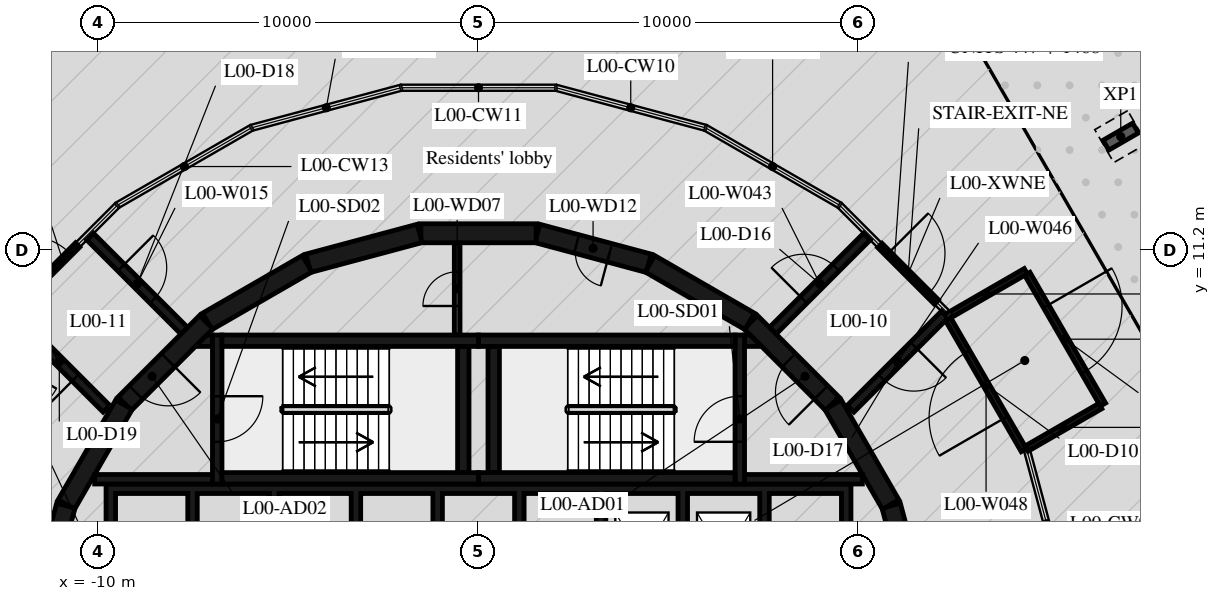
"""IFC4 building model, lengths in metres.
Left out: names, types, materials, properties, quantities, classifications, styles, units other than length and angle.
Written with IfcOpenShell. Run it as: python <this file> out.ifc"""

import sys

from ifc_helpers import new_model, si_unit, direction, frame, frame_2d, origin, origin_2d, place, context, subcontext, project, spatial, polyline, rectangle, i_section, outline, extrude, element, fill, save


model = new_model("IFC4")
c1 = context("Model", 3, precision=1e-05, world=origin(), true_north=direction((0.0, 1.0)))
c2 = subcontext(c1, "Body", "Model", "MODEL_VIEW")
j1 = project(units=[si_unit("LENGTHUNIT", "METRE"), si_unit("PLANEANGLEUNIT", "RADIAN")], contexts=[c1])
p1 = place(None, origin())
s1 = spatial("IfcSite", under=j1, at=p1, CompositionType="ELEMENT")
p2 = place(p1, origin())
s2 = spatial("IfcBuilding", under=s1, at=p2, CompositionType="ELEMENT")
p3 = place(p2, origin())
s3 = spatial("IfcBuildingStorey", under=s2, at=p3, CompositionType="ELEMENT", Elevation=0.0)
p4 = place(p3, frame((16.899, 14.19, -0.42), z_axis=(0.0, 0.0, 1.0), x_axis=(0.50000017485, -0.866025302835, 0.0)))
e1 = element("IfcColumn", 1, at=p4, inside=s3, PredefinedType="COLUMN", context=c2, shape_type="SweptSolid", body=[
    extrude(i_section(OverallWidth=0.3, OverallDepth=0.9, WebThickness=0.019, FlangeThickness=0.035, FilletRadius=0.03, at=origin_2d()), origin(), (0.0, 0.0, 1.0), 9.04),
])
p5 = place(p3, frame((10.562, 11.325, 0.0), z_axis=(0.0, 0.0, 1.0), x_axis=(0.707106781187, -0.707106781187, 0.0)))
e2 = element("IfcWall", 2, at=p5, inside=s3, PredefinedType="STANDARD", context=c2, shape_type="SweptSolid", body=[
    extrude(rectangle(XDim=2.1, YDim=0.16, at=frame_2d((1.05, 0.0))), origin(), (0.0, 0.0, 1.0), 8.5),
])
p6 = place(p5, frame((0.3, 0.0, 0.0)))
e3 = element("IfcOpeningElement", 3, at=p6, cuts=e2, PredefinedType="OPENING", context=c2, shape_type="SweptSolid", body=[
    extrude(rectangle(XDim=1.5, YDim=2.1, at=frame_2d((0.75, 1.05))), frame((0.0, 0.09, 0.0), z_axis=(0.0, -1.0, 0.0), x_axis=(1.0, 0.0, 0.0)), (0.0, 0.0, 1.0), 0.18),
])
p7 = place(p3, frame((-12.032, 9.855, 0.0), z_axis=(0.0, 0.0, 1.0), x_axis=(0.70704865247, 0.707164905125, 0.0)))
e4 = element("IfcWall", 4, at=p7, inside=s3, PredefinedType="STANDARD", context=c2, shape_type="SweptSolid", body=[
    extrude(rectangle(XDim=2.1, YDim=0.16, at=frame_2d((1.05, 0.0))), origin(), (0.0, 0.0, 1.0), 8.5),
])
p8 = place(p7, frame((0.3, 0.0, 0.0)))
e5 = element("IfcOpeningElement", 5, at=p8, cuts=e4, PredefinedType="OPENING", context=c2, shape_type="SweptSolid", body=[
    extrude(rectangle(XDim=1.5, YDim=2.1, at=frame_2d((0.75, 1.05))), frame((0.0, 0.09, 0.0), z_axis=(0.0, -1.0, 0.0), x_axis=(1.0, 0.0, 0.0)), (0.0, 0.0, 1.0), 0.18),
])
for number, where, z_axis, x_axis in (
    (6, (11.643, 1.55, 0.0), (0.0, 0.0, 1.0), (-0.259, 0.966, 0.0)),
    (7, (10.845, 4.51, 0.0), (0.0, 0.0, 1.0), (-0.5, 0.866, 0.0)),
):
    element("IfcWall", number, at=place(p3, frame(where, z_axis=z_axis, x_axis=x_axis)), inside=s3, PredefinedType="SHEAR", context=c2, shape_type="SweptSolid", body=[
        extrude(rectangle(XDim=3.033, YDim=0.5, at=frame_2d((1.516, 0.0))), origin(), (0.0, 0.0, 1.0), 8.62),
    ])
p9 = place(p3, frame((9.308, 7.164, 0.0), z_axis=(0.0, 0.0, 1.0), x_axis=(-0.707106781187, 0.707106781187, 0.0)))
e8 = element("IfcWall", 8, at=p9, inside=s3, PredefinedType="SHEAR", context=c2, shape_type="SweptSolid", body=[
    extrude(rectangle(XDim=3.032, YDim=0.5, at=frame_2d((1.516, 0.0))), origin(), (0.0, 0.0, 1.0), 8.62),
])
p10 = place(p9, frame((0.416, 0.0, 0.0)))
e9 = element("IfcOpeningElement", 9, at=p10, cuts=e8, PredefinedType="OPENING", context=c2, shape_type="SweptSolid", body=[
    extrude(rectangle(XDim=1.2, YDim=2.1, at=frame_2d((0.6, 1.05))), frame((0.0, 0.26, 0.0), z_axis=(0.0, -1.0, 0.0), x_axis=(1.0, 0.0, 0.0)), (0.0, 0.0, 1.0), 0.52),
])
p11 = place(p3, frame((7.137, 9.329, 0.0), z_axis=(0.0, 0.0, 1.0), x_axis=(-0.865975092491, 0.500087131594, 0.0)))
e10 = element("IfcWall", 10, at=p11, inside=s3, PredefinedType="SHEAR", context=c2, shape_type="SweptSolid", body=[
    extrude(rectangle(XDim=3.033, YDim=0.5, at=frame_2d((1.516, 0.0))), origin(), (0.0, 0.0, 1.0), 8.62),
])
p12 = place(p3, frame((4.479, 10.858, 0.0), z_axis=(0.0, 0.0, 1.0), x_axis=(-0.965948410781, 0.258734743916, 0.0)))
e11 = element("IfcWall", 11, at=p12, inside=s3, PredefinedType="SHEAR", context=c2, shape_type="SweptSolid", body=[
    extrude(rectangle(XDim=3.033, YDim=0.5, at=frame_2d((1.516, 0.0))), origin(), (0.0, 0.0, 1.0), 8.62),
])
p13 = place(p12, frame((1.066, 0.0, 0.0)))
e12 = element("IfcOpeningElement", 12, at=p13, cuts=e11, PredefinedType="OPENING", context=c2, shape_type="SweptSolid", body=[
    extrude(rectangle(XDim=0.9, YDim=2.1, at=frame_2d((0.45, 1.05))), frame((0.0, 0.26, 0.0), z_axis=(0.0, -1.0, 0.0), x_axis=(1.0, 0.0, 0.0)), (0.0, 0.0, 1.0), 0.52),
])
for number, where, z_axis, x_axis in (
    (13, (1.516, 11.647, 0.0), (0.0, 0.0, 1.0), (-1.0, 0.0, 0.0)),
    (14, (-1.55, 11.643, 0.0), (0.0, 0.0, 1.0), (-0.966, -0.259, 0.0)),
    (15, (-4.51, 10.845, 0.0), (0.0, 0.0, 1.0), (-0.866, -0.5, 0.0)),
):
    element("IfcWall", number, at=place(p3, frame(where, z_axis=z_axis, x_axis=x_axis)), inside=s3, PredefinedType="SHEAR", context=c2, shape_type="SweptSolid", body=[
        extrude(rectangle(XDim=3.033, YDim=0.5, at=frame_2d((1.516, 0.0))), origin(), (0.0, 0.0, 1.0), 8.62),
    ])
p14 = place(p3, frame((-7.164, 9.308, 0.0), z_axis=(0.0, 0.0, 1.0), x_axis=(-0.707106781187, -0.707106781187, 0.0)))
e16 = element("IfcWall", 16, at=p14, inside=s3, PredefinedType="SHEAR", context=c2, shape_type="SweptSolid", body=[
    extrude(rectangle(XDim=3.032, YDim=0.5, at=frame_2d((1.516, 0.0))), origin(), (0.0, 0.0, 1.0), 8.62),
])
p15 = place(p14, frame((1.416, 0.0, 0.0)))
e17 = element("IfcOpeningElement", 17, at=p15, cuts=e16, PredefinedType="OPENING", context=c2, shape_type="SweptSolid", body=[
    extrude(rectangle(XDim=1.2, YDim=2.1, at=frame_2d((0.6, 1.05))), frame((0.0, 0.26, 0.0), z_axis=(0.0, -1.0, 0.0), x_axis=(1.0, 0.0, 0.0)), (0.0, 0.0, 1.0), 0.52),
])
for number, where, z_axis, x_axis in (
    (18, (-9.329, 7.137, 0.0), (0.0, 0.0, 1.0), (-0.5, -0.866, 0.0)),
    (19, (-10.858, 4.479, 0.0), (0.0, 0.0, 1.0), (-0.259, -0.966, 0.0)),
):
    element("IfcWall", number, at=place(p3, frame(where, z_axis=z_axis, x_axis=x_axis)), inside=s3, PredefinedType="SHEAR", context=c2, shape_type="SweptSolid", body=[
        extrude(rectangle(XDim=3.033, YDim=0.5, at=frame_2d((1.516, 0.0))), origin(), (0.0, 0.0, 1.0), 8.62),
    ])
for number, where, z_axis, x_axis in (
    (20, (0.0, 5.2, 0.0), (0.0, 0.0, 1.0), (1.0, 0.0, 0.0)),
    (21, (0.0, 8.82, 0.0), (0.0, 0.0, 1.0), (1.0, 0.0, 0.0)),
):
    element("IfcWall", number, at=place(p3, frame(where, z_axis=z_axis, x_axis=x_axis)), inside=s3, PredefinedType="SHEAR", context=c2, shape_type="SweptSolid", body=[
        extrude(rectangle(XDim=6.75, YDim=0.3, at=frame_2d((3.375, 0.0))), origin(), (0.0, 0.0, 1.0), 8.62),
    ])
p16 = place(p3, frame((0.4, 5.35, 0.0), z_axis=(0.0, 0.0, 1.0), x_axis=(0.0, 1.0, 0.0)))
e22 = element("IfcWall", 22, at=p16, inside=s3, PredefinedType="SHEAR", context=c2, shape_type="SweptSolid", body=[
    extrude(rectangle(XDim=3.32, YDim=0.3, at=frame_2d((1.66, 0.0))), origin(), (0.0, 0.0, 1.0), 8.62),
])
p17 = place(p3, frame((6.875, 5.05, 0.0), z_axis=(0.0, 0.0, 1.0), x_axis=(0.0, 1.0, 0.0)))
e23 = element("IfcWall", 23, at=p17, inside=s3, PredefinedType="SHEAR", context=c2, shape_type="SweptSolid", body=[
    extrude(rectangle(XDim=3.92, YDim=0.25, at=frame_2d((1.96, 0.0))), origin(), (0.0, 0.0, 1.0), 8.62),
])
p18 = place(p17, frame((1.11, 0.0, 0.0)))
e24 = element("IfcOpeningElement", 24, at=p18, cuts=e23, PredefinedType="OPENING", context=c2, shape_type="SweptSolid", body=[
    extrude(rectangle(XDim=1.2, YDim=2.1, at=frame_2d((0.6, 1.05))), frame((0.0, 0.135, 0.0), z_axis=(0.0, -1.0, 0.0), x_axis=(1.0, 0.0, 0.0)), (0.0, 0.0, 1.0), 0.27),
])
p19 = place(p3, frame((7.0, 5.175, 0.0), z_axis=(0.0, 0.0, 1.0), x_axis=(1.0, 0.0, 0.0)))
e25 = element("IfcWall", 25, at=p19, inside=s3, PredefinedType="SHEAR", context=c2, shape_type="SweptSolid", body=[
    extrude(rectangle(XDim=3.1, YDim=0.25, at=frame_2d((1.55, 0.0))), origin(), (0.0, 0.0, 1.0), 8.62),
])
p20 = place(p3, origin())
e26 = element("IfcWall", 26, at=p20, inside=s3, PredefinedType="SHEAR", context=c2, shape_type="SweptSolid", body=[
    extrude(outline(polyline([(7.448, 8.67), (7.0, 8.67), (7.0, 8.97), (7.148, 8.97), (7.448, 8.67)])), origin(), (0.0, 0.0, 1.0), 8.62),
])
for number, where, z_axis, x_axis in (
    (27, (-6.75, 5.2, 0.0), (0.0, 0.0, 1.0), (1.0, 0.0, 0.0)),
    (28, (-6.75, 8.82, 0.0), (0.0, 0.0, 1.0), (1.0, 0.0, 0.0)),
):
    element("IfcWall", number, at=place(p3, frame(where, z_axis=z_axis, x_axis=x_axis)), inside=s3, PredefinedType="SHEAR", context=c2, shape_type="SweptSolid", body=[
        extrude(rectangle(XDim=6.75, YDim=0.3, at=frame_2d((3.375, 0.0))), origin(), (0.0, 0.0, 1.0), 8.62),
    ])
p21 = place(p3, frame((-0.4, 5.35, 0.0), z_axis=(0.0, 0.0, 1.0), x_axis=(0.0, 1.0, 0.0)))
e29 = element("IfcWall", 29, at=p21, inside=s3, PredefinedType="SHEAR", context=c2, shape_type="SweptSolid", body=[
    extrude(rectangle(XDim=3.32, YDim=0.3, at=frame_2d((1.66, 0.0))), origin(), (0.0, 0.0, 1.0), 8.62),
])
p22 = place(p3, frame((-6.875, 8.97, 0.0), z_axis=(0.0, 0.0, 1.0), x_axis=(0.0, -1.0, 0.0)))
e30 = element("IfcWall", 30, at=p22, inside=s3, PredefinedType="SHEAR", context=c2, shape_type="SweptSolid", body=[
    extrude(rectangle(XDim=3.92, YDim=0.25, at=frame_2d((1.96, 0.0))), origin(), (0.0, 0.0, 1.0), 8.62),
])
p23 = place(p22, frame((1.61, 0.0, 0.0)))
e31 = element("IfcOpeningElement", 31, at=p23, cuts=e30, PredefinedType="OPENING", context=c2, shape_type="SweptSolid", body=[
    extrude(rectangle(XDim=1.2, YDim=2.1, at=frame_2d((0.6, 1.05))), frame((0.0, 0.135, 0.0), z_axis=(0.0, -1.0, 0.0), x_axis=(1.0, 0.0, 0.0)), (0.0, 0.0, 1.0), 0.27),
])
p24 = place(p3, frame((-7.0, 5.175, 0.0), z_axis=(0.0, 0.0, 1.0), x_axis=(-1.0, 0.0, 0.0)))
e32 = element("IfcWall", 32, at=p24, inside=s3, PredefinedType="SHEAR", context=c2, shape_type="SweptSolid", body=[
    extrude(rectangle(XDim=3.1, YDim=0.25, at=frame_2d((1.55, 0.0))), origin(), (0.0, 0.0, 1.0), 8.62),
])
p25 = place(p3, origin())
e33 = element("IfcWall", 33, at=p25, inside=s3, PredefinedType="SHEAR", context=c2, shape_type="SweptSolid", body=[
    extrude(outline(polyline([(-7.148, 8.97), (-7.0, 8.97), (-7.0, 8.67), (-7.448, 8.67), (-7.148, 8.97)])), origin(), (0.0, 0.0, 1.0), 8.62),
])
p26 = place(p3, origin())
e34 = element("IfcWall", 34, at=p26, inside=s3, PredefinedType="SHEAR", context=c2, shape_type="SweptSolid", body=[
    extrude(outline(polyline([(-9.55, 4.8), (-7.65, 4.8), (-7.65, 1.9), (-7.4, 1.9), (-7.4, 4.8), (-5.5, 4.8), (-5.5, 1.9), (-5.25, 1.9), (-5.25, 4.8), (-3.35, 4.8), (-3.35, 1.9), (-3.1, 1.9), (-3.1, 4.8), (-1.2, 4.8), (-1.2, 1.9), (-0.95, 1.9), (-0.95, 4.8), (0.95, 4.8), (0.95, 1.9), (1.2, 1.9), (1.2, 4.8), (3.1, 4.8), (3.1, 1.9), (3.35, 1.9), (3.35, 4.8), (5.25, 4.8), (5.25, 1.9), (5.5, 1.9), (5.5, 4.8), (7.4, 4.8), (7.4, 1.9), (7.65, 1.9), (7.65, 4.8), (9.55, 4.8), (9.55, 1.9), (9.8, 1.9), (9.8, 4.8), (9.8, 5.05), (-9.8, 5.05), (-9.8, 4.8), (-9.8, 1.9), (-9.55, 1.9), (-9.55, 4.8)])), origin(), (0.0, 0.0, 1.0), 8.62),
])
p27 = place(p3, frame((-0.562, 8.97, 0.0), z_axis=(0.0, 0.0, 1.0), x_axis=(0.0, 1.0, 0.0)))
e35 = element("IfcWall", 35, at=p27, inside=s3, PredefinedType="PARTITIONING", context=c2, shape_type="SweptSolid", body=[
    extrude(rectangle(XDim=2.427, YDim=0.15, at=frame_2d((1.214, 0.0))), origin(), (0.0, 0.0, 1.0), 8.62),
])
p28 = place(p27, frame((0.764, 0.0, 0.0)))
e36 = element("IfcOpeningElement", 36, at=p28, cuts=e35, PredefinedType="OPENING", context=c2, shape_type="SweptSolid", body=[
    extrude(rectangle(XDim=0.9, YDim=2.1, at=frame_2d((0.45, 1.05))), frame((0.0, 0.085, 0.0), z_axis=(0.0, -1.0, 0.0), x_axis=(1.0, 0.0, 0.0)), (0.0, 0.0, 1.0), 0.17),
])
p29 = place(p3, frame((-10.22, 11.56, 0.0), z_axis=(0.0, 0.0, 1.0), x_axis=(0.707106781187, -0.707106781187, 0.0)))
e37 = element("IfcWall", 37, at=p29, inside=s3, PredefinedType="PARTITIONING", context=c2, shape_type="SweptSolid", body=[
    extrude(rectangle(XDim=3.507, YDim=0.25, at=frame_2d((1.754, 0.0))), origin(), (0.0, 0.0, 1.0), 8.62),
])
p30 = place(p29, frame((1.154, 0.0, 0.0)))
e38 = element("IfcOpeningElement", 38, at=p30, cuts=e37, PredefinedType="OPENING", context=c2, shape_type="SweptSolid", body=[
    extrude(rectangle(XDim=1.2, YDim=2.1, at=frame_2d((0.6, 1.05))), frame((0.0, 0.135, 0.0), z_axis=(0.0, -1.0, 0.0), x_axis=(1.0, 0.0, 0.0)), (0.0, 0.0, 1.0), 0.27),
])
p31 = place(p3, frame((-9.79, 7.03, 0.0), z_axis=(0.0, 0.0, 1.0), x_axis=(-0.707106781187, 0.707106781187, 0.0)))
e39 = element("IfcWall", 39, at=p31, inside=s3, PredefinedType="PARTITIONING", context=c2, shape_type="SweptSolid", body=[
    extrude(rectangle(XDim=3.507, YDim=0.25, at=frame_2d((1.754, 0.0))), origin(), (0.0, 0.0, 1.0), 8.62),
])
p32 = place(p31, frame((1.154, 0.0, 0.0)))
e40 = element("IfcOpeningElement", 40, at=p32, cuts=e39, PredefinedType="OPENING", context=c2, shape_type="SweptSolid", body=[
    extrude(rectangle(XDim=1.2, YDim=2.1, at=frame_2d((0.6, 1.05))), frame((0.0, 0.135, 0.0), z_axis=(0.0, -1.0, 0.0), x_axis=(1.0, 0.0, 0.0)), (0.0, 0.0, 1.0), 0.27),
])
p33 = place(p3, frame((7.74, 9.08, 0.0), z_axis=(0.0, 0.0, 1.0), x_axis=(0.707106781187, 0.707106781187, 0.0)))
e41 = element("IfcWall", 41, at=p33, inside=s3, PredefinedType="PARTITIONING", context=c2, shape_type="SweptSolid", body=[
    extrude(rectangle(XDim=3.507, YDim=0.25, at=frame_2d((1.754, 0.0))), origin(), (0.0, 0.0, 1.0), 8.62),
])
p34 = place(p33, frame((1.154, 0.0, 0.0)))
e42 = element("IfcOpeningElement", 42, at=p34, cuts=e41, PredefinedType="OPENING", context=c2, shape_type="SweptSolid", body=[
    extrude(rectangle(XDim=1.2, YDim=2.1, at=frame_2d((0.6, 1.05))), frame((0.0, 0.135, 0.0), z_axis=(0.0, -1.0, 0.0), x_axis=(1.0, 0.0, 0.0)), (0.0, 0.0, 1.0), 0.27),
])
p35 = place(p3, frame((12.27, 9.51, 0.0), z_axis=(0.0, 0.0, 1.0), x_axis=(-0.707106781187, -0.707106781187, 0.0)))
e43 = element("IfcWall", 43, at=p35, inside=s3, PredefinedType="PARTITIONING", context=c2, shape_type="SweptSolid", body=[
    extrude(rectangle(XDim=3.507, YDim=0.25, at=frame_2d((1.754, 0.0))), origin(), (0.0, 0.0, 1.0), 8.62),
])
p36 = place(p35, frame((1.154, 0.0, 0.0)))
e44 = element("IfcOpeningElement", 44, at=p36, cuts=e43, PredefinedType="OPENING", context=c2, shape_type="SweptSolid", body=[
    extrude(rectangle(XDim=1.2, YDim=2.1, at=frame_2d((0.6, 1.05))), frame((0.0, 0.135, 0.0), z_axis=(0.0, -1.0, 0.0), x_axis=(1.0, 0.0, 0.0)), (0.0, 0.0, 1.0), 0.27),
])
p37 = place(p3, frame((12.32, 9.45, 0.0), z_axis=(0.0, 0.0, 1.0), x_axis=(0.866177122335, 0.499737123639, 0.0)))
e45 = element("IfcWall", 45, at=p37, inside=s3, PredefinedType="PARTITIONING", context=c2, shape_type="SweptSolid", body=[
    extrude(rectangle(XDim=2.401, YDim=0.16, at=frame_2d((1.201, 0.0))), origin(), (0.0, 0.0, 1.0), 3.0),
])
p38 = place(p3, frame((14.35, 5.94, 0.0), z_axis=(0.0, 0.0, 1.0), x_axis=(-0.500636730463, 0.865657475051, 0.0)))
e46 = element("IfcWall", 46, at=p38, inside=s3, PredefinedType="PARTITIONING", context=c2, shape_type="SweptSolid", body=[
    extrude(rectangle(XDim=3.975, YDim=0.16, at=frame_2d((1.987, 0.0))), origin(), (0.0, 0.0, 1.0), 3.0),
])
p39 = place(p38, frame((0.987, 0.0, 0.0)))
e47 = element("IfcOpeningElement", 47, at=p39, cuts=e46, PredefinedType="OPENING", context=c2, shape_type="SweptSolid", body=[
    extrude(rectangle(XDim=2.0, YDim=2.4, at=frame_2d((1.0, 1.2))), frame((0.0, 0.09, 0.0), z_axis=(0.0, -1.0, 0.0), x_axis=(1.0, 0.0, 0.0)), (0.0, 0.0, 1.0), 0.18),
])
p40 = place(p3, frame((14.44, 10.581, 0.0), z_axis=(0.0, 0.0, 1.0), x_axis=(0.500636730463, -0.865657475051, 0.0)))
e48 = element("IfcWall", 48, at=p40, inside=s3, PredefinedType="PARTITIONING", context=c2, shape_type="SweptSolid", body=[
    extrude(rectangle(XDim=3.975, YDim=0.16, at=frame_2d((1.987, 0.0))), origin(), (0.0, 0.0, 1.0), 3.0),
])
p41 = place(p40, frame((0.987, 0.0, 0.0)))
e49 = element("IfcOpeningElement", 49, at=p41, cuts=e48, PredefinedType="OPENING", context=c2, shape_type="SweptSolid", body=[
    extrude(rectangle(XDim=2.0, YDim=2.4, at=frame_2d((1.0, 1.2))), frame((0.0, 0.09, 0.0), z_axis=(0.0, -1.0, 0.0), x_axis=(1.0, 0.0, 0.0)), (0.0, 0.0, 1.0), 0.18),
])
p42 = place(p3, frame((16.361, 7.1, 0.0), z_axis=(0.0, 0.0, 1.0), x_axis=(-0.866171078478, -0.499747599102, 0.0)))
e50 = element("IfcWall", 50, at=p42, inside=s3, PredefinedType="PARTITIONING", context=c2, shape_type="SweptSolid", body=[
    extrude(rectangle(XDim=2.241, YDim=0.16, at=frame_2d((1.121, 0.0))), origin(), (0.0, 0.0, 1.0), 3.0),
])
p43 = place(p6, origin())
e51 = element("IfcDoor", 51, at=p43, inside=s3, OperationType="DOUBLE_DOOR_SINGLE_SWING", PredefinedType="DOOR", context=c2, shape_type="SweptSolid", body=[
    extrude(rectangle(XDim=1.5, YDim=2.1, at=frame_2d((0.75, 1.05))), frame((0.0, 0.025, 0.0), z_axis=(0.0, -1.0, 0.0), x_axis=(1.0, 0.0, 0.0)), (0.0, 0.0, 1.0), 0.05),
])
fill(e3, e51)
p44 = place(p8, origin())
e52 = element("IfcDoor", 52, at=p44, inside=s3, OperationType="DOUBLE_DOOR_SINGLE_SWING", PredefinedType="DOOR", context=c2, shape_type="SweptSolid", body=[
    extrude(rectangle(XDim=1.5, YDim=2.1, at=frame_2d((0.75, 1.05))), frame((0.0, 0.025, 0.0), z_axis=(0.0, -1.0, 0.0), x_axis=(1.0, 0.0, 0.0)), (0.0, 0.0, 1.0), 0.05),
])
fill(e5, e52)
p45 = place(p18, origin())
e53 = element("IfcDoor", 53, at=p45, inside=s3, OperationType="SINGLE_SWING_LEFT", PredefinedType="DOOR", context=c2, shape_type="SweptSolid", body=[
    extrude(rectangle(XDim=1.2, YDim=2.1, at=frame_2d((0.6, 1.05))), frame((0.0, 0.025, 0.0), z_axis=(0.0, -1.0, 0.0), x_axis=(1.0, 0.0, 0.0)), (0.0, 0.0, 1.0), 0.05),
])
fill(e24, e53)
p46 = place(p10, origin())
e54 = element("IfcDoor", 54, at=p46, inside=s3, OperationType="SINGLE_SWING_RIGHT", PredefinedType="DOOR", context=c2, shape_type="SweptSolid", body=[
    extrude(rectangle(XDim=1.2, YDim=2.1, at=frame_2d((0.6, 1.05))), frame((0.0, 0.025, 0.0), z_axis=(0.0, -1.0, 0.0), x_axis=(1.0, 0.0, 0.0)), (0.0, 0.0, 1.0), 0.05),
])
fill(e9, e54)
p47 = place(p23, origin())
e55 = element("IfcDoor", 55, at=p47, inside=s3, OperationType="SINGLE_SWING_LEFT", PredefinedType="DOOR", context=c2, shape_type="SweptSolid", body=[
    extrude(rectangle(XDim=1.2, YDim=2.1, at=frame_2d((0.6, 1.05))), frame((0.0, 0.025, 0.0), z_axis=(0.0, -1.0, 0.0), x_axis=(1.0, 0.0, 0.0)), (0.0, 0.0, 1.0), 0.05),
])
fill(e31, e55)
p48 = place(p15, origin())
e56 = element("IfcDoor", 56, at=p48, inside=s3, OperationType="SINGLE_SWING_RIGHT", PredefinedType="DOOR", context=c2, shape_type="SweptSolid", body=[
    extrude(rectangle(XDim=1.2, YDim=2.1, at=frame_2d((0.6, 1.05))), frame((0.0, 0.025, 0.0), z_axis=(0.0, -1.0, 0.0), x_axis=(1.0, 0.0, 0.0)), (0.0, 0.0, 1.0), 0.05),
])
fill(e17, e56)
p49 = place(p28, origin())
e57 = element("IfcDoor", 57, at=p49, inside=s3, OperationType="SINGLE_SWING_RIGHT", PredefinedType="DOOR", context=c2, shape_type="SweptSolid", body=[
    extrude(rectangle(XDim=0.9, YDim=2.1, at=frame_2d((0.45, 1.05))), frame((0.0, 0.025, 0.0), z_axis=(0.0, -1.0, 0.0), x_axis=(1.0, 0.0, 0.0)), (0.0, 0.0, 1.0), 0.05),
])
fill(e36, e57)
p50 = place(p13, origin())
e58 = element("IfcDoor", 58, at=p50, inside=s3, OperationType="SINGLE_SWING_LEFT", PredefinedType="DOOR", context=c2, shape_type="SweptSolid", body=[
    extrude(rectangle(XDim=0.9, YDim=2.1, at=frame_2d((0.45, 1.05))), frame((0.0, 0.025, 0.0), z_axis=(0.0, -1.0, 0.0), x_axis=(1.0, 0.0, 0.0)), (0.0, 0.0, 1.0), 0.05),
])
fill(e12, e58)
p51 = place(p39, origin())
e59 = element("IfcDoor", 59, at=p51, inside=s3, OperationType="DOUBLE_DOOR_SINGLE_SWING", PredefinedType="DOOR", context=c2, shape_type="SweptSolid", body=[
    extrude(rectangle(XDim=2.0, YDim=2.4, at=frame_2d((1.0, 1.2))), frame((0.0, 0.025, 0.0), z_axis=(0.0, -1.0, 0.0), x_axis=(1.0, 0.0, 0.0)), (0.0, 0.0, 1.0), 0.05),
])
fill(e47, e59)
p52 = place(p41, origin())
e60 = element("IfcDoor", 60, at=p52, inside=s3, OperationType="DOUBLE_DOOR_SINGLE_SWING", PredefinedType="DOOR", context=c2, shape_type="SweptSolid", body=[
    extrude(rectangle(XDim=2.0, YDim=2.4, at=frame_2d((1.0, 1.2))), frame((0.0, 0.025, 0.0), z_axis=(0.0, -1.0, 0.0), x_axis=(1.0, 0.0, 0.0)), (0.0, 0.0, 1.0), 0.05),
])
fill(e49, e60)
p53 = place(p34, origin())
e61 = element("IfcDoor", 61, at=p53, inside=s3, OperationType="SINGLE_SWING_LEFT", PredefinedType="DOOR", context=c2, shape_type="SweptSolid", body=[
    extrude(rectangle(XDim=1.2, YDim=2.1, at=frame_2d((0.6, 1.05))), frame((0.0, 0.025, 0.0), z_axis=(0.0, -1.0, 0.0), x_axis=(1.0, 0.0, 0.0)), (0.0, 0.0, 1.0), 0.05),
])
fill(e42, e61)
p54 = place(p36, origin())
e62 = element("IfcDoor", 62, at=p54, inside=s3, OperationType="SINGLE_SWING_LEFT", PredefinedType="DOOR", context=c2, shape_type="SweptSolid", body=[
    extrude(rectangle(XDim=1.2, YDim=2.1, at=frame_2d((0.6, 1.05))), frame((0.0, 0.025, 0.0), z_axis=(0.0, -1.0, 0.0), x_axis=(1.0, 0.0, 0.0)), (0.0, 0.0, 1.0), 0.05),
])
fill(e44, e62)
p55 = place(p30, origin())
e63 = element("IfcDoor", 63, at=p55, inside=s3, OperationType="SINGLE_SWING_LEFT", PredefinedType="DOOR", context=c2, shape_type="SweptSolid", body=[
    extrude(rectangle(XDim=1.2, YDim=2.1, at=frame_2d((0.6, 1.05))), frame((0.0, 0.025, 0.0), z_axis=(0.0, -1.0, 0.0), x_axis=(1.0, 0.0, 0.0)), (0.0, 0.0, 1.0), 0.05),
])
fill(e38, e63)
p56 = place(p32, origin())
e64 = element("IfcDoor", 64, at=p56, inside=s3, OperationType="SINGLE_SWING_LEFT", PredefinedType="DOOR", context=c2, shape_type="SweptSolid", body=[
    extrude(rectangle(XDim=1.2, YDim=2.1, at=frame_2d((0.6, 1.05))), frame((0.0, 0.025, 0.0), z_axis=(0.0, -1.0, 0.0), x_axis=(1.0, 0.0, 0.0)), (0.0, 0.0, 1.0), 0.05),
])
fill(e40, e64)
save(model, sys.argv[1])
